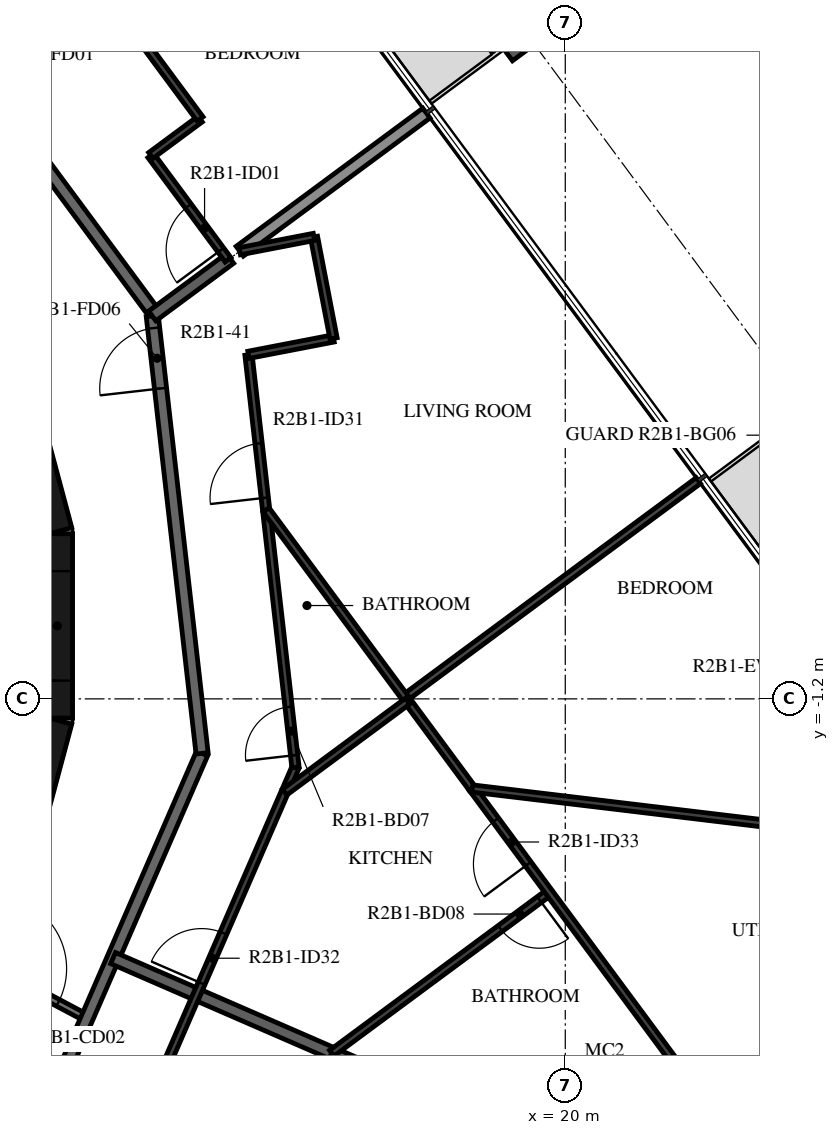
"""IFC4 building model, lengths in metres.
Left out: names, types, materials, properties, quantities, classifications, styles, units other than length and angle.
Written with IfcOpenShell. Run it as: python <this file> out.ifc"""

import sys

from ifc_helpers import new_model, si_unit, direction, frame, frame_2d, origin, origin_2d, place, context, subcontext, project, spatial, rectangle, i_section, extrude, element, fill, save


model = new_model("IFC4")
c1 = context("Model", 3, precision=1e-05, world=origin(), true_north=direction((0.0, 1.0)))
c2 = subcontext(c1, "Body", "Model", "MODEL_VIEW")
j1 = project(units=[si_unit("LENGTHUNIT", "METRE"), si_unit("PLANEANGLEUNIT", "RADIAN")], contexts=[c1])
p1 = place(None, origin())
s1 = spatial("IfcSite", under=j1, at=p1, CompositionType="ELEMENT")
p2 = place(p1, origin())
s2 = spatial("IfcBuilding", under=s1, at=p2, CompositionType="ELEMENT")
p3 = place(p2, frame((0.0, 0.0, 87.2)))
s3 = spatial("IfcBuildingStorey", under=s2, at=p3, CompositionType="ELEMENT", Elevation=87.2)
p4 = place(p3, frame((19.405, 9.682, -0.38), z_axis=(0.0, 0.0, 1.0), x_axis=(0.594822857897, -0.803856807972, 0.0)))
e1 = element("IfcColumn", 1, at=p4, inside=s3, PredefinedType="COLUMN", context=c2, shape_type="SweptSolid", body=[
    extrude(i_section(OverallWidth=0.3, OverallDepth=0.9, WebThickness=0.019, FlangeThickness=0.035, FilletRadius=0.03, at=origin_2d()), origin(), (0.0, 0.0, 1.0), 3.5),
])
p5 = place(p3, frame((10.858, -4.479, 0.0), z_axis=(0.0, 0.0, 1.0), x_axis=(0.258734743916, 0.965948410781, 0.0)))
e2 = element("IfcWall", 2, at=p5, inside=s3, PredefinedType="SHEAR", context=c2, shape_type="SweptSolid", body=[
    extrude(rectangle(XDim=3.033, YDim=0.5, at=frame_2d((1.516, 0.0))), origin(), (0.0, 0.0, 1.0), 3.12),
])
p6 = place(p3, frame((11.647, -1.516, 0.0), z_axis=(0.0, 0.0, 1.0), x_axis=(0.0, 1.0, 0.0)))
e3 = element("IfcWall", 3, at=p6, inside=s3, PredefinedType="SHEAR", context=c2, shape_type="SweptSolid", body=[
    extrude(rectangle(XDim=3.033, YDim=0.5, at=frame_2d((1.516, 0.0))), origin(), (0.0, 0.0, 1.0), 3.12),
])
p7 = place(p6, frame((0.616, 0.0, 0.0)))
e4 = element("IfcOpeningElement", 4, at=p7, cuts=e3, PredefinedType="OPENING", context=c2, shape_type="SweptSolid", body=[
    extrude(rectangle(XDim=1.8, YDim=2.1, at=frame_2d((0.9, 1.05))), frame((0.0, 0.26, 0.0), z_axis=(0.0, -1.0, 0.0), x_axis=(1.0, 0.0, 0.0)), (0.0, 0.0, 1.0), 0.52),
])
p8 = place(p3, frame((11.643, 1.55, 0.0), z_axis=(0.0, 0.0, 1.0), x_axis=(-0.258734743916, 0.965948410781, 0.0)))
e5 = element("IfcWall", 5, at=p8, inside=s3, PredefinedType="SHEAR", context=c2, shape_type="SweptSolid", body=[
    extrude(rectangle(XDim=3.033, YDim=0.5, at=frame_2d((1.516, 0.0))), origin(), (0.0, 0.0, 1.0), 3.12),
])
p9 = place(p3, frame((10.511, -5.589, 0.0), z_axis=(0.0, 0.0, 1.0), x_axis=(0.882962602189, -0.469443333253, 0.0)))
e6 = element("IfcWall", 6, at=p9, inside=s3, PredefinedType="PARTITIONING", context=c2, shape_type="SweptSolid", body=[
    extrude(rectangle(XDim=1.838, YDim=0.12, at=frame_2d((0.919, 0.0))), origin(), (0.0, 0.0, 1.0), 3.12),
])
p10 = place(p9, frame((0.1, 0.0, 0.0)))
e7 = element("IfcOpeningElement", 7, at=p10, cuts=e6, PredefinedType="OPENING", context=c2, shape_type="SweptSolid", body=[
    extrude(rectangle(XDim=1.2, YDim=2.1, at=frame_2d((0.6, 1.05))), frame((0.0, 0.07, 0.0), z_axis=(0.0, -1.0, 0.0), x_axis=(1.0, 0.0, 0.0)), (0.0, 0.0, 1.0), 0.14),
])
p11 = place(p3, frame((13.196, 5.198, 0.0), z_axis=(0.0, 0.0, 1.0), x_axis=(-0.594805187394, 0.803869883159, 0.0)))
e8 = element("IfcWall", 8, at=p11, inside=s3, PredefinedType="STANDARD", context=c2, shape_type="SweptSolid", body=[
    extrude(rectangle(XDim=7.342, YDim=0.2, at=frame_2d((3.671, 0.0))), origin(), (0.0, 0.0, 1.0), 3.12),
])
p12 = place(p11, frame((4.7, 0.0, 0.0)))
e9 = element("IfcOpeningElement", 9, at=p12, cuts=e8, PredefinedType="OPENING", context=c2, shape_type="SweptSolid", body=[
    extrude(rectangle(XDim=1.0, YDim=2.1, at=frame_2d((0.5, 1.05))), frame((0.0, 0.11, 0.0), z_axis=(0.0, -1.0, 0.0), x_axis=(1.0, 0.0, 0.0)), (0.0, 0.0, 1.0), 0.22),
])
p13 = place(p3, frame((11.1, -8.829, 0.0), z_axis=(0.0, 0.0, 1.0), x_axis=(0.398741918631, 0.917063183388, 0.0)))
e10 = element("IfcWall", 10, at=p13, inside=s3, PredefinedType="STANDARD", context=c2, shape_type="SweptSolid", body=[
    extrude(rectangle(XDim=7.342, YDim=0.2, at=frame_2d((3.671, 0.0))), origin(), (0.0, 0.0, 1.0), 3.12),
])
p14 = place(p3, frame((14.028, -2.096, 0.0), z_axis=(0.0, 0.0, 1.0), x_axis=(-0.113207047924, 0.993571418822, 0.0)))
e11 = element("IfcWall", 11, at=p14, inside=s3, PredefinedType="STANDARD", context=c2, shape_type="SweptSolid", body=[
    extrude(rectangle(XDim=7.24, YDim=0.2, at=frame_2d((3.62, 0.0))), origin(), (0.0, 0.0, 1.0), 3.12),
])
p15 = place(p14, frame((6.04, 0.0, 0.0)))
e12 = element("IfcOpeningElement", 12, at=p15, cuts=e11, PredefinedType="OPENING", context=c2, shape_type="SweptSolid", body=[
    extrude(rectangle(XDim=1.0, YDim=2.1, at=frame_2d((0.5, 1.05))), frame((0.0, 0.11, 0.0), z_axis=(0.0, -1.0, 0.0), x_axis=(1.0, 0.0, 0.0)), (0.0, 0.0, 1.0), 0.22),
])
p16 = place(p3, frame((13.208, 5.097, 0.0), z_axis=(0.0, 0.0, 1.0), x_axis=(0.803831627965, 0.594856885211, 0.0)))
e13 = element("IfcWall", 13, at=p16, inside=s3, PredefinedType="STANDARD", context=c2, shape_type="SweptSolid", body=[
    extrude(rectangle(XDim=1.591, YDim=0.2, at=frame_2d((0.796, 0.0))), origin(), (0.0, 0.0, 1.0), 3.12),
])
p17 = place(p3, frame((14.647, 6.161, 0.0), z_axis=(0.0, 0.0, 1.0), x_axis=(0.803842510616, 0.594842179175, 0.0)))
e14 = element("IfcWall", 14, at=p17, inside=s3, PredefinedType="STANDARD", context=c2, shape_type="SweptSolid", body=[
    extrude(rectangle(XDim=3.819, YDim=0.2, at=frame_2d((1.909, 0.0))), origin(), (0.0, 0.0, 1.0), 2.73),
])
p18 = place(p3, frame((16.16, -7.027, 0.0), z_axis=(0.0, 0.0, 1.0), x_axis=(-0.917065107526, 0.398737493293, 0.0)))
e15 = element("IfcWall", 15, at=p18, inside=s3, PredefinedType="STANDARD", context=c2, shape_type="SweptSolid", body=[
    extrude(rectangle(XDim=3.922, YDim=0.2, at=frame_2d((1.961, 0.0))), origin(), (0.0, 0.0, 1.0), 3.12),
])
p19 = place(p3, frame((19.198, -8.347, 0.0), z_axis=(0.0, 0.0, 1.0), x_axis=(-0.917046616943, 0.398780017495, 0.0)))
e16 = element("IfcWall", 16, at=p19, inside=s3, PredefinedType="STANDARD", context=c2, shape_type="SweptSolid", body=[
    extrude(rectangle(XDim=3.312, YDim=0.2, at=frame_2d((1.656, 0.0))), origin(), (0.0, 0.0, 1.0), 3.12),
])
p20 = place(p3, frame((14.455, 6.019, 0.0), z_axis=(0.0, 0.0, 1.0), x_axis=(-0.594792774379, 0.803879067737, 0.0)))
e17 = element("IfcWall", 17, at=p20, inside=s3, PredefinedType="PARTITIONING", context=c2, shape_type="SweptSolid", body=[
    extrude(rectangle(XDim=2.136, YDim=0.12, at=frame_2d((1.068, 0.0))), origin(), (0.0, 0.0, 1.0), 3.12),
])
p21 = place(p20, frame((0.2, 0.0, 0.0)))
e18 = element("IfcOpeningElement", 18, at=p21, cuts=e17, PredefinedType="OPENING", context=c2, shape_type="SweptSolid", body=[
    extrude(rectangle(XDim=0.9, YDim=2.1, at=frame_2d((0.45, 1.05))), frame((0.0, 0.07, 0.0), z_axis=(0.0, -1.0, 0.0), x_axis=(1.0, 0.0, 0.0)), (0.0, 0.0, 1.0), 0.14),
])
p22 = place(p3, frame((13.185, 7.736, 0.0), z_axis=(0.0, 0.0, 1.0), x_axis=(0.803934518159, 0.594717824277, 0.0)))
e19 = element("IfcWall", 19, at=p22, inside=s3, PredefinedType="PARTITIONING", context=c2, shape_type="SweptSolid", body=[
    extrude(rectangle(XDim=1.008, YDim=0.12, at=frame_2d((0.504, 0.0))), origin(), (0.0, 0.0, 1.0), 3.12),
])
p23 = place(p3, frame((13.995, 8.336, 0.0), z_axis=(0.0, 0.0, 1.0), x_axis=(-0.59480284986, 0.803871612758, 0.0)))
e20 = element("IfcWall", 20, at=p23, inside=s3, PredefinedType="PARTITIONING", context=c2, shape_type="SweptSolid", body=[
    extrude(rectangle(XDim=4.4, YDim=0.12, at=frame_2d((2.2, 0.0))), origin(), (0.0, 0.0, 1.0), 3.12),
])
p24 = place(p3, frame((12.703, -8.904, 0.0), z_axis=(0.0, 0.0, 1.0), x_axis=(0.398716154453, 0.917074385303, 0.0)))
e21 = element("IfcWall", 21, at=p24, inside=s3, PredefinedType="PARTITIONING", context=c2, shape_type="SweptSolid", body=[
    extrude(rectangle(XDim=7.173, YDim=0.12, at=frame_2d((3.586, 0.0))), origin(), (0.0, 0.0, 1.0), 3.12),
])
p25 = place(p24, frame((3.3, 0.0, 0.0)))
e22 = element("IfcOpeningElement", 22, at=p25, cuts=e21, PredefinedType="OPENING", context=c2, shape_type="SweptSolid", body=[
    extrude(rectangle(XDim=0.9, YDim=2.1, at=frame_2d((0.45, 1.05))), frame((0.0, 0.07, 0.0), z_axis=(0.0, -1.0, 0.0), x_axis=(1.0, 0.0, 0.0)), (0.0, 0.0, 1.0), 0.14),
])
p26 = place(p3, frame((15.563, -2.326, 0.0), z_axis=(0.0, 0.0, 1.0), x_axis=(-0.113209750844, 0.993571110849, 0.0)))
e23 = element("IfcWall", 23, at=p26, inside=s3, PredefinedType="PARTITIONING", context=c2, shape_type="SweptSolid", body=[
    extrude(rectangle(XDim=6.828, YDim=0.12, at=frame_2d((3.414, 0.0))), origin(), (0.0, 0.0, 1.0), 3.12),
])
p27 = place(p26, frame((4.461, 0.0, 0.0)))
e24 = element("IfcOpeningElement", 24, at=p27, cuts=e23, PredefinedType="OPENING", context=c2, shape_type="SweptSolid", body=[
    extrude(rectangle(XDim=0.9, YDim=2.1, at=frame_2d((0.45, 1.05))), frame((0.0, 0.07, 0.0), z_axis=(0.0, -1.0, 0.0), x_axis=(1.0, 0.0, 0.0)), (0.0, 0.0, 1.0), 0.14),
])
p28 = place(p26, frame((0.2, 0.0, 0.0)))
e25 = element("IfcOpeningElement", 25, at=p28, cuts=e23, PredefinedType="OPENING", context=c2, shape_type="SweptSolid", body=[
    extrude(rectangle(XDim=0.8, YDim=2.1, at=frame_2d((0.4, 1.05))), frame((0.0, 0.07, 0.0), z_axis=(0.0, -1.0, 0.0), x_axis=(1.0, 0.0, 0.0)), (0.0, 0.0, 1.0), 0.14),
])
p29 = place(p3, frame((14.79, 4.458, 0.0), z_axis=(0.0, 0.0, 1.0), x_axis=(0.981914676232, 0.189323977881, 0.0)))
e26 = element("IfcWall", 26, at=p29, inside=s3, PredefinedType="PARTITIONING", context=c2, shape_type="SweptSolid", body=[
    extrude(rectangle(XDim=1.425, YDim=0.12, at=frame_2d((0.712, 0.0))), origin(), (0.0, 0.0, 1.0), 3.12),
])
p30 = place(p3, frame((16.189, 4.728, 0.0), z_axis=(0.0, 0.0, 1.0), x_axis=(-0.18942796612, 0.981894620441, 0.0)))
e27 = element("IfcWall", 27, at=p30, inside=s3, PredefinedType="PARTITIONING", context=c2, shape_type="SweptSolid", body=[
    extrude(rectangle(XDim=1.7, YDim=0.12, at=frame_2d((0.85, 0.0))), origin(), (0.0, 0.0, 1.0), 3.12),
])
p31 = place(p3, frame((15.867, 6.397, 0.0), z_axis=(0.0, 0.0, 1.0), x_axis=(-0.981909648822, -0.189350050303, 0.0)))
e28 = element("IfcWall", 28, at=p31, inside=s3, PredefinedType="PARTITIONING", context=c2, shape_type="SweptSolid", body=[
    extrude(rectangle(XDim=1.243, YDim=0.12, at=frame_2d((0.622, 0.0))), origin(), (0.0, 0.0, 1.0), 3.12),
])
p32 = place(p3, frame((17.366, -1.18, 0.0), z_axis=(0.0, 0.0, 1.0), x_axis=(0.803855518832, 0.594824600065, 0.0)))
e29 = element("IfcWall", 29, at=p32, inside=s3, PredefinedType="PARTITIONING", context=c2, shape_type="SweptSolid", body=[
    extrude(rectangle(XDim=6.0, YDim=0.12, at=frame_2d((3.0, 0.0))), origin(), (0.0, 0.0, 1.0), 2.73),
])
p33 = place(p3, frame((15.081, 1.907, 0.0), z_axis=(0.0, 0.0, 1.0), x_axis=(0.594819754849, -0.803859104098, 0.0)))
e30 = element("IfcWall", 30, at=p33, inside=s3, PredefinedType="PARTITIONING", context=c2, shape_type="SweptSolid", body=[
    extrude(rectangle(XDim=5.699, YDim=0.12, at=frame_2d((2.85, 0.0))), origin(), (0.0, 0.0, 1.0), 3.12),
])
p34 = place(p3, frame((28.162, -6.368, 0.0), z_axis=(0.0, 0.0, 1.0), x_axis=(-0.944645847702, -0.328091789624, 0.0)))
e31 = element("IfcWall", 31, at=p34, inside=s3, PredefinedType="PARTITIONING", context=c2, shape_type="SweptSolid", body=[
    extrude(rectangle(XDim=6.007, YDim=0.12, at=frame_2d((3.003, 0.0))), origin(), (0.0, 0.0, 1.0), 3.12),
])
p35 = place(p34, frame((0.2, 0.0, 0.0)))
e32 = element("IfcOpeningElement", 32, at=p35, cuts=e31, PredefinedType="OPENING", context=c2, shape_type="SweptSolid", body=[
    extrude(rectangle(XDim=0.9, YDim=2.1, at=frame_2d((0.45, 1.05))), frame((0.0, 0.07, 0.0), z_axis=(0.0, -1.0, 0.0), x_axis=(1.0, 0.0, 0.0)), (0.0, 0.0, 1.0), 0.14),
])
p36 = place(p3, frame((19.735, -4.382, 0.0), z_axis=(0.0, 0.0, 1.0), x_axis=(-0.803850825108, -0.594830943188, 0.0)))
e33 = element("IfcWall", 33, at=p36, inside=s3, PredefinedType="PARTITIONING", context=c2, shape_type="SweptSolid", body=[
    extrude(rectangle(XDim=4.447, YDim=0.12, at=frame_2d((2.223, 0.0))), origin(), (0.0, 0.0, 1.0), 3.12),
])
p37 = place(p36, frame((0.2, 0.0, 0.0)))
e34 = element("IfcOpeningElement", 34, at=p37, cuts=e33, PredefinedType="OPENING", context=c2, shape_type="SweptSolid", body=[
    extrude(rectangle(XDim=0.8, YDim=2.1, at=frame_2d((0.4, 1.05))), frame((0.0, 0.07, 0.0), z_axis=(0.0, -1.0, 0.0), x_axis=(1.0, 0.0, 0.0)), (0.0, 0.0, 1.0), 0.14),
])
p38 = place(p3, frame((22.048, -7.507, 0.0), z_axis=(0.0, 0.0, 1.0), x_axis=(-0.59484195588, 0.803842675855, 0.0)))
e35 = element("IfcWall", 35, at=p38, inside=s3, PredefinedType="PARTITIONING", context=c2, shape_type="SweptSolid", body=[
    extrude(rectangle(XDim=6.012, YDim=0.12, at=frame_2d((3.006, 0.0))), origin(), (0.0, 0.0, 1.0), 3.12),
])
p39 = place(p38, frame((4.469, 0.0, 0.0)))
e36 = element("IfcOpeningElement", 36, at=p39, cuts=e35, PredefinedType="OPENING", context=c2, shape_type="SweptSolid", body=[
    extrude(rectangle(XDim=0.9, YDim=2.1, at=frame_2d((0.45, 1.05))), frame((0.0, 0.07, 0.0), z_axis=(0.0, -1.0, 0.0), x_axis=(1.0, 0.0, 0.0)), (0.0, 0.0, 1.0), 0.14),
])
p40 = place(p3, frame((17.408, -1.237, 0.0), z_axis=(0.0, 0.0, 1.0), x_axis=(-0.803863255433, -0.594814144556, 0.0)))
e37 = element("IfcWall", 37, at=p40, inside=s3, PredefinedType="PARTITIONING", context=c2, shape_type="SweptSolid", body=[
    extrude(rectangle(XDim=2.514, YDim=0.12, at=frame_2d((1.257, 0.0))), origin(), (0.0, 0.0, 1.0), 3.12),
])
p41 = place(p3, frame((26.661, -3.655, 0.0), z_axis=(0.0, 0.0, 1.0), x_axis=(-0.992903144553, 0.11892579845, 0.0)))
e38 = element("IfcWall", 38, at=p41, inside=s3, PredefinedType="PARTITIONING", context=c2, shape_type="SweptSolid", body=[
    extrude(rectangle(XDim=8.249, YDim=0.12, at=frame_2d((4.124, 0.0))), origin(), (0.0, 0.0, 1.0), 3.12),
])
p42 = place(p41, frame((0.8, 0.0, 0.0)))
e39 = element("IfcOpeningElement", 39, at=p42, cuts=e38, PredefinedType="OPENING", context=c2, shape_type="SweptSolid", body=[
    extrude(rectangle(XDim=0.9, YDim=2.1, at=frame_2d((0.45, 1.05))), frame((0.0, 0.07, 0.0), z_axis=(0.0, -1.0, 0.0), x_axis=(1.0, 0.0, 0.0)), (0.0, 0.0, 1.0), 0.14),
])
p43 = place(p7, origin())
e40 = element("IfcDoor", 40, at=p43, inside=s3, OperationType="DOUBLE_DOOR_SINGLE_SWING", PredefinedType="DOOR", context=c2, shape_type="SweptSolid", body=[
    extrude(rectangle(XDim=1.8, YDim=2.1, at=frame_2d((0.9, 1.05))), frame((0.0, 0.025, 0.0), z_axis=(0.0, -1.0, 0.0), x_axis=(1.0, 0.0, 0.0)), (0.0, 0.0, 1.0), 0.05),
])
fill(e4, e40)
p44 = place(p21, origin())
e41 = element("IfcDoor", 41, at=p44, inside=s3, OperationType="SINGLE_SWING_LEFT", PredefinedType="DOOR", context=c2, shape_type="SweptSolid", body=[
    extrude(rectangle(XDim=0.9, YDim=2.1, at=frame_2d((0.45, 1.05))), frame((0.0, 0.025, 0.0), z_axis=(0.0, -1.0, 0.0), x_axis=(1.0, 0.0, 0.0)), (0.0, 0.0, 1.0), 0.05),
])
fill(e18, e41)
p45 = place(p15, origin())
e42 = element("IfcDoor", 42, at=p45, inside=s3, OperationType="SINGLE_SWING_LEFT", PredefinedType="DOOR", context=c2, shape_type="SweptSolid", body=[
    extrude(rectangle(XDim=1.0, YDim=2.1, at=frame_2d((0.5, 1.05))), frame((0.0, 0.025, 0.0), z_axis=(0.0, -1.0, 0.0), x_axis=(1.0, 0.0, 0.0)), (0.0, 0.0, 1.0), 0.05),
])
fill(e12, e42)
p46 = place(p27, origin())
e43 = element("IfcDoor", 43, at=p46, inside=s3, OperationType="SINGLE_SWING_LEFT", PredefinedType="DOOR", context=c2, shape_type="SweptSolid", body=[
    extrude(rectangle(XDim=0.9, YDim=2.1, at=frame_2d((0.45, 1.05))), frame((0.0, 0.025, 0.0), z_axis=(0.0, -1.0, 0.0), x_axis=(1.0, 0.0, 0.0)), (0.0, 0.0, 1.0), 0.05),
])
fill(e24, e43)
p47 = place(p25, origin())
e44 = element("IfcDoor", 44, at=p47, inside=s3, OperationType="SINGLE_SWING_RIGHT", PredefinedType="DOOR", context=c2, shape_type="SweptSolid", body=[
    extrude(rectangle(XDim=0.9, YDim=2.1, at=frame_2d((0.45, 1.05))), frame((0.0, 0.025, 0.0), z_axis=(0.0, -1.0, 0.0), x_axis=(1.0, 0.0, 0.0)), (0.0, 0.0, 1.0), 0.05),
])
fill(e22, e44)
p48 = place(p28, origin())
e45 = element("IfcDoor", 45, at=p48, inside=s3, OperationType="SINGLE_SWING_LEFT", PredefinedType="DOOR", context=c2, shape_type="SweptSolid", body=[
    extrude(rectangle(XDim=0.8, YDim=2.1, at=frame_2d((0.4, 1.05))), frame((0.0, 0.025, 0.0), z_axis=(0.0, -1.0, 0.0), x_axis=(1.0, 0.0, 0.0)), (0.0, 0.0, 1.0), 0.05),
])
fill(e25, e45)
p49 = place(p37, origin())
e46 = element("IfcDoor", 46, at=p49, inside=s3, OperationType="SINGLE_SWING_LEFT", PredefinedType="DOOR", context=c2, shape_type="SweptSolid", body=[
    extrude(rectangle(XDim=0.8, YDim=2.1, at=frame_2d((0.4, 1.05))), frame((0.0, 0.025, 0.0), z_axis=(0.0, -1.0, 0.0), x_axis=(1.0, 0.0, 0.0)), (0.0, 0.0, 1.0), 0.05),
])
fill(e34, e46)
p50 = place(p39, origin())
e47 = element("IfcDoor", 47, at=p50, inside=s3, OperationType="SINGLE_SWING_LEFT", PredefinedType="DOOR", context=c2, shape_type="SweptSolid", body=[
    extrude(rectangle(XDim=0.9, YDim=2.1, at=frame_2d((0.45, 1.05))), frame((0.0, 0.025, 0.0), z_axis=(0.0, -1.0, 0.0), x_axis=(1.0, 0.0, 0.0)), (0.0, 0.0, 1.0), 0.05),
])
fill(e36, e47)
p51 = place(p10, origin())
e48 = element("IfcDoor", 48, at=p51, inside=s3, OperationType="DOUBLE_DOOR_SINGLE_SWING", PredefinedType="DOOR", context=c2, shape_type="SweptSolid", body=[
    extrude(rectangle(XDim=1.2, YDim=2.1, at=frame_2d((0.6, 1.05))), frame((0.0, 0.025, 0.0), z_axis=(0.0, -1.0, 0.0), x_axis=(1.0, 0.0, 0.0)), (0.0, 0.0, 1.0), 0.05),
])
fill(e7, e48)
save(model, sys.argv[1])
